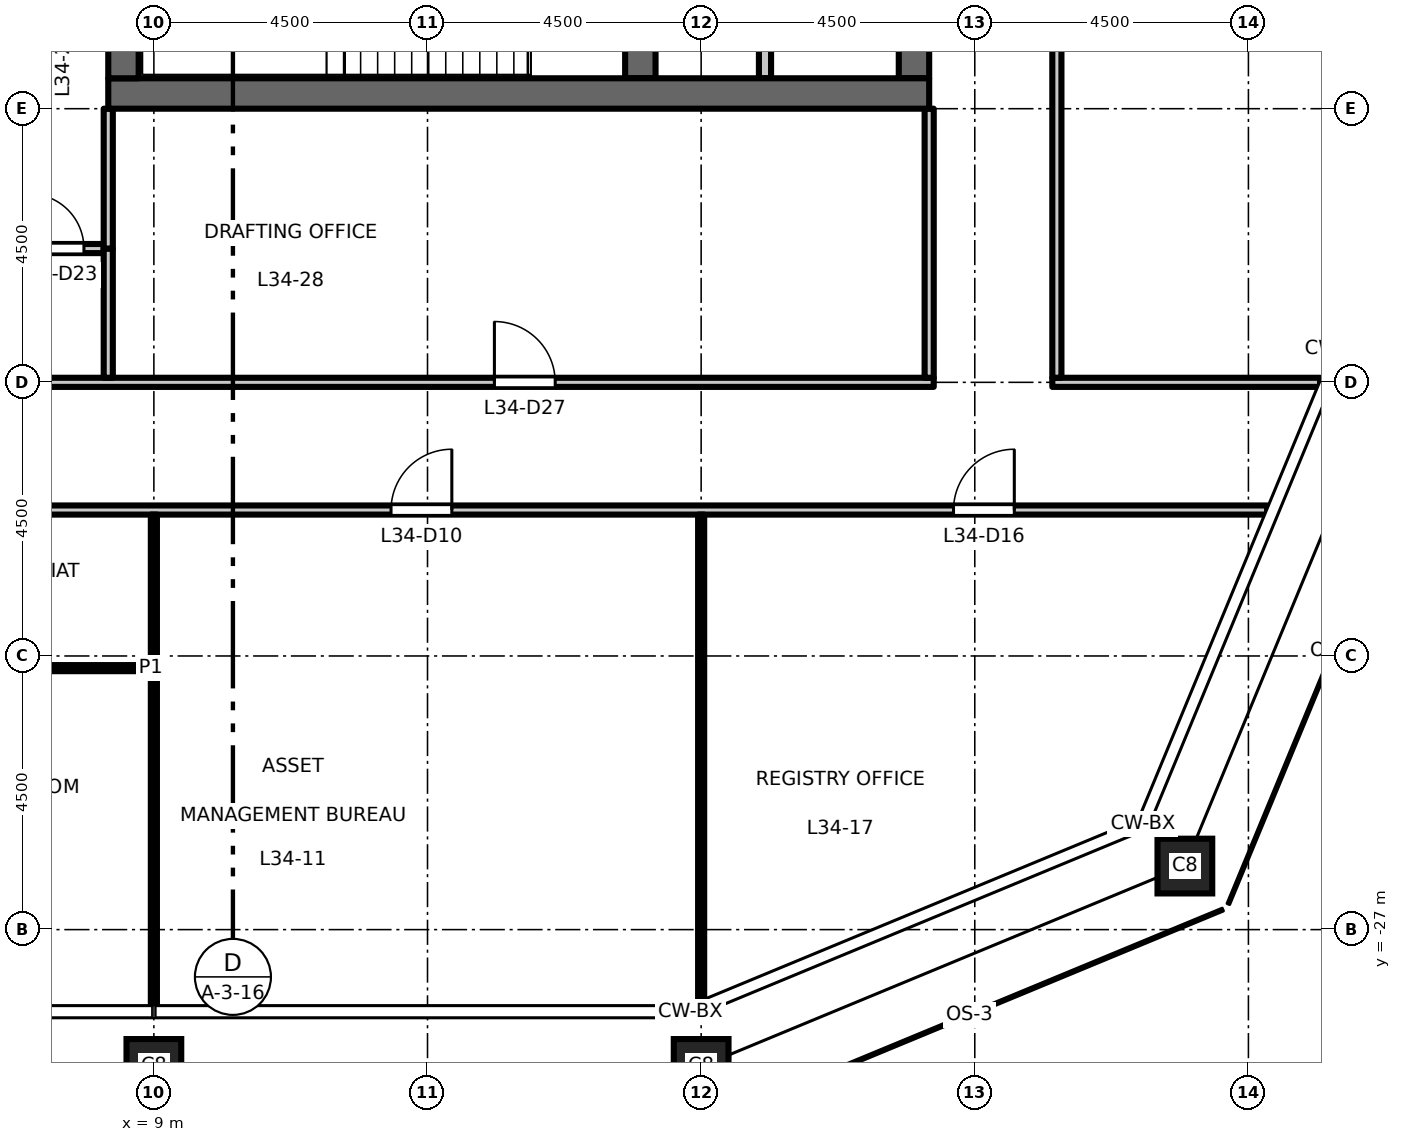
"""IFC4 building model, lengths in metres.
Left out: names, types, materials, properties, quantities, classifications, styles, units other than length and angle.
Written with IfcOpenShell. Run it as: python <this file> out.ifc"""

import sys

from ifc_helpers import new_model, si_unit, direction, frame, frame_2d, origin, origin_2d, place, context, subcontext, project, spatial, rectangle, hollow_rectangle, extrude, element, fill, save


model = new_model("IFC4")
c1 = context("Model", 3, precision=1e-05, world=origin(), true_north=direction((0.0, 1.0)))
c2 = subcontext(c1, "Body", "Model", "MODEL_VIEW")
j1 = project(units=[si_unit("LENGTHUNIT", "METRE"), si_unit("PLANEANGLEUNIT", "RADIAN")], contexts=[c1])
p1 = place(None, origin())
s1 = spatial("IfcSite", under=j1, at=p1, CompositionType="ELEMENT")
p2 = place(p1, origin())
s2 = spatial("IfcBuilding", under=s1, at=p2, CompositionType="ELEMENT")
p3 = place(p2, frame((0.0, 0.0, 158.7)))
s3 = spatial("IfcBuildingStorey", under=s2, at=p3, CompositionType="ELEMENT", Elevation=158.7)
for number, where, z_axis, x_axis in (
    (1, (9.0, -29.25, 0.0), (0.0, 0.0, 1.0), (1.0, 0.0, 0.0)),
    (2, (18.0, -29.25, 0.0), (0.0, 0.0, 1.0), (1.0, 0.0, 0.0)),
    (3, (25.955, -25.955, 0.0), (0.0, 0.0, 1.0), (1.0, 0.0, 0.0)),
):
    element("IfcColumn", number, at=place(p3, frame(where, z_axis=z_axis, x_axis=x_axis)), inside=s3, PredefinedType="COLUMN", context=c2, shape_type="SweptSolid", body=[
        extrude(hollow_rectangle(XDim=0.9, YDim=0.9, WallThickness=0.05, at=origin_2d()), origin(), (0.0, 0.0, 1.0), 4.5),
    ])
p4 = place(p3, frame((21.5, -13.0, 0.0), z_axis=(0.0, 0.0, 1.0), x_axis=(0.0, 1.0, 0.0)))
e4 = element("IfcWall", 4, at=p4, inside=s3, PredefinedType="SHEAR", context=c2, shape_type="SweptSolid", body=[
    extrude(rectangle(XDim=26.0, YDim=0.5, at=frame_2d((13.0, 0.0))), origin(), (0.0, 0.0, 1.0), 4.35),
])
p5 = place(p4, frame((16.825, 0.0, 0.0)))
e5 = element("IfcOpeningElement", 5, at=p5, cuts=e4, PredefinedType="OPENING", context=c2, shape_type="SweptSolid", body=[
    extrude(rectangle(XDim=1.8, YDim=2.1, at=frame_2d((0.9, 1.05))), frame((0.0, 0.26, 0.0), z_axis=(0.0, -1.0, 0.0), x_axis=(1.0, 0.0, 0.0)), (0.0, 0.0, 1.0), 0.52),
])
p6 = place(p4, frame((7.375, 0.0, 0.0)))
e6 = element("IfcOpeningElement", 6, at=p6, cuts=e4, PredefinedType="OPENING", context=c2, shape_type="SweptSolid", body=[
    extrude(rectangle(XDim=1.8, YDim=2.1, at=frame_2d((0.9, 1.05))), frame((0.0, 0.26, 0.0), z_axis=(0.0, -1.0, 0.0), x_axis=(1.0, 0.0, 0.0)), (0.0, 0.0, 1.0), 0.52),
])
p7 = place(p4, frame((23.8, 0.0, 0.0)))
e7 = element("IfcOpeningElement", 7, at=p7, cuts=e4, PredefinedType="OPENING", context=c2, shape_type="SweptSolid", body=[
    extrude(rectangle(XDim=0.9, YDim=2.1, at=frame_2d((0.45, 1.05))), frame((0.0, 0.26, 0.0), z_axis=(0.0, -1.0, 0.0), x_axis=(1.0, 0.0, 0.0)), (0.0, 0.0, 1.0), 0.52),
])
p8 = place(p3, frame((19.05, -13.0, 0.0), z_axis=(0.0, 0.0, 1.0), x_axis=(0.0, 1.0, 0.0)))
e8 = element("IfcWall", 8, at=p8, inside=s3, PredefinedType="PARTITIONING", context=c2, shape_type="SweptSolid", body=[
    extrude(rectangle(XDim=6.575, YDim=0.2, at=frame_2d((3.288, 0.0))), origin(), (0.0, 0.0, 1.0), 4.35),
])
p9 = place(p3, frame((17.0, -13.0, 0.0), z_axis=(0.0, 0.0, 1.0), x_axis=(0.0, 1.0, 0.0)))
e9 = element("IfcWall", 9, at=p9, inside=s3, PredefinedType="SHEAR", context=c2, shape_type="SweptSolid", body=[
    extrude(rectangle(XDim=6.575, YDim=0.5, at=frame_2d((3.288, 0.0))), origin(), (0.0, 0.0, 1.0), 4.35),
])
p10 = place(p3, frame((8.25, -13.25, 0.0), z_axis=(0.0, 0.0, 1.0), x_axis=(1.0, 0.0, 0.0)))
e10 = element("IfcWall", 10, at=p10, inside=s3, PredefinedType="SHEAR", context=c2, shape_type="SweptSolid", body=[
    extrude(rectangle(XDim=13.5, YDim=0.5, at=frame_2d((6.75, 0.0))), origin(), (0.0, 0.0, 1.0), 4.35),
])
p11 = place(p3, frame((8.5, -13.0, 0.0), z_axis=(0.0, 0.0, 1.0), x_axis=(0.0, 1.0, 0.0)))
e11 = element("IfcWall", 11, at=p11, inside=s3, PredefinedType="SHEAR", context=c2, shape_type="SweptSolid", body=[
    extrude(rectangle(XDim=26.0, YDim=0.5, at=frame_2d((13.0, 0.0))), origin(), (0.0, 0.0, 1.0), 4.35),
])
p12 = place(p3, frame((0.05, -22.7, 0.0), z_axis=(0.0, 0.0, 1.0), x_axis=(1.0, 0.0, 0.0)))
e12 = element("IfcWall", 12, at=p12, inside=s3, PredefinedType="PARTITIONING", context=c2, shape_type="SweptSolid", body=[
    extrude(rectangle(XDim=8.9, YDim=0.1, at=frame_2d((4.45, 0.0))), origin(), (0.0, 0.0, 1.0), 4.35),
])
p13 = place(p12, frame((3.85, 0.0, 0.0)))
e13 = element("IfcOpeningElement", 13, at=p13, cuts=e12, PredefinedType="OPENING", context=c2, shape_type="SweptSolid", body=[
    extrude(rectangle(XDim=1.0, YDim=2.1, at=frame_2d((0.5, 1.05))), frame((0.0, 0.06, 0.0), z_axis=(0.0, -1.0, 0.0), x_axis=(1.0, 0.0, 0.0)), (0.0, 0.0, 1.0), 0.12),
])
p14 = place(p3, frame((-27.308, -20.1, 0.0), z_axis=(0.0, 0.0, 1.0), x_axis=(1.0, 0.0, 0.0)))
e14 = element("IfcWall", 14, at=p14, inside=s3, PredefinedType="PARTITIONING", context=c2, shape_type="SweptSolid", body=[
    extrude(rectangle(XDim=54.616, YDim=0.15, at=frame_2d((27.308, 0.0))), origin(), (0.0, 0.0, 1.0), 4.35),
])
p15 = place(p14, frame((13.208, 0.0, 0.0)))
e15 = element("IfcOpeningElement", 15, at=p15, cuts=e14, PredefinedType="OPENING", context=c2, shape_type="SweptSolid", body=[
    extrude(rectangle(XDim=1.0, YDim=2.1, at=frame_2d((0.5, 1.05))), frame((0.0, 0.085, 0.0), z_axis=(0.0, -1.0, 0.0), x_axis=(1.0, 0.0, 0.0)), (0.0, 0.0, 1.0), 0.17),
])
p16 = place(p14, frame((22.208, 0.0, 0.0)))
e16 = element("IfcOpeningElement", 16, at=p16, cuts=e14, PredefinedType="OPENING", context=c2, shape_type="SweptSolid", body=[
    extrude(rectangle(XDim=1.0, YDim=2.1, at=frame_2d((0.5, 1.05))), frame((0.0, 0.085, 0.0), z_axis=(0.0, -1.0, 0.0), x_axis=(1.0, 0.0, 0.0)), (0.0, 0.0, 1.0), 0.17),
])
p17 = place(p14, frame((31.208, 0.0, 0.0)))
e17 = element("IfcOpeningElement", 17, at=p17, cuts=e14, PredefinedType="OPENING", context=c2, shape_type="SweptSolid", body=[
    extrude(rectangle(XDim=1.0, YDim=2.1, at=frame_2d((0.5, 1.05))), frame((0.0, 0.085, 0.0), z_axis=(0.0, -1.0, 0.0), x_axis=(1.0, 0.0, 0.0)), (0.0, 0.0, 1.0), 0.17),
])
p18 = place(p14, frame((40.208, 0.0, 0.0)))
e18 = element("IfcOpeningElement", 18, at=p18, cuts=e14, PredefinedType="OPENING", context=c2, shape_type="SweptSolid", body=[
    extrude(rectangle(XDim=1.0, YDim=2.1, at=frame_2d((0.5, 1.05))), frame((0.0, 0.085, 0.0), z_axis=(0.0, -1.0, 0.0), x_axis=(1.0, 0.0, 0.0)), (0.0, 0.0, 1.0), 0.17),
])
p19 = place(p14, frame((4.15, 0.0, 0.0)))
e19 = element("IfcOpeningElement", 19, at=p19, cuts=e14, PredefinedType="OPENING", context=c2, shape_type="SweptSolid", body=[
    extrude(rectangle(XDim=1.0, YDim=2.1, at=frame_2d((0.5, 1.05))), frame((0.0, 0.085, 0.0), z_axis=(0.0, -1.0, 0.0), x_axis=(1.0, 0.0, 0.0)), (0.0, 0.0, 1.0), 0.17),
])
p20 = place(p14, frame((49.458, 0.0, 0.0)))
e20 = element("IfcOpeningElement", 20, at=p20, cuts=e14, PredefinedType="OPENING", context=c2, shape_type="SweptSolid", body=[
    extrude(rectangle(XDim=1.0, YDim=2.1, at=frame_2d((0.5, 1.05))), frame((0.0, 0.085, 0.0), z_axis=(0.0, -1.0, 0.0), x_axis=(1.0, 0.0, 0.0)), (0.0, 0.0, 1.0), 0.17),
])
p21 = place(p3, frame((-21.825, -18.0, 0.0), z_axis=(0.0, 0.0, 1.0), x_axis=(1.0, 0.0, 0.0)))
e21 = element("IfcWall", 21, at=p21, inside=s3, PredefinedType="PARTITIONING", context=c2, shape_type="SweptSolid", body=[
    extrude(rectangle(XDim=43.65, YDim=0.15, at=frame_2d((21.825, 0.0))), origin(), (0.0, 0.0, 1.0), 4.35),
])
p22 = place(p21, frame((21.425, 0.0, 0.0)))
e22 = element("IfcOpeningElement", 22, at=p22, cuts=e21, PredefinedType="OPENING", context=c2, shape_type="SweptSolid", body=[
    extrude(rectangle(XDim=1.0, YDim=2.1, at=frame_2d((0.5, 1.05))), frame((0.0, 0.085, 0.0), z_axis=(0.0, -1.0, 0.0), x_axis=(1.0, 0.0, 0.0)), (0.0, 0.0, 1.0), 0.17),
])
p23 = place(p21, frame((6.425, 0.0, 0.0)))
e23 = element("IfcOpeningElement", 23, at=p23, cuts=e21, PredefinedType="OPENING", context=c2, shape_type="SweptSolid", body=[
    extrude(rectangle(XDim=1.0, YDim=2.1, at=frame_2d((0.5, 1.05))), frame((0.0, 0.085, 0.0), z_axis=(0.0, -1.0, 0.0), x_axis=(1.0, 0.0, 0.0)), (0.0, 0.0, 1.0), 0.17),
])
p24 = place(p21, frame((36.425, 0.0, 0.0)))
e24 = element("IfcOpeningElement", 24, at=p24, cuts=e21, PredefinedType="OPENING", context=c2, shape_type="SweptSolid", body=[
    extrude(rectangle(XDim=1.0, YDim=2.1, at=frame_2d((0.5, 1.05))), frame((0.0, 0.085, 0.0), z_axis=(0.0, -1.0, 0.0), x_axis=(1.0, 0.0, 0.0)), (0.0, 0.0, 1.0), 0.17),
])
p25 = place(p3, frame((23.775, -18.0, 0.0), z_axis=(0.0, 0.0, 1.0), x_axis=(1.0, 0.0, 0.0)))
e25 = element("IfcWall", 25, at=p25, inside=s3, PredefinedType="PARTITIONING", context=c2, shape_type="SweptSolid", body=[
    extrude(rectangle(XDim=4.403, YDim=0.15, at=frame_2d((2.202, 0.0))), origin(), (0.0, 0.0, 1.0), 4.35),
])
p26 = place(p3, frame((6.8, -15.8, 0.0), z_axis=(0.0, 0.0, 1.0), x_axis=(1.0, 0.0, 0.0)))
e26 = element("IfcWall", 26, at=p26, inside=s3, PredefinedType="PARTITIONING", context=c2, shape_type="SweptSolid", body=[
    extrude(rectangle(XDim=1.375, YDim=0.15, at=frame_2d((0.688, 0.0))), origin(), (0.0, 0.0, 1.0), 4.35),
])
p27 = place(p26, frame((0.15, 0.0, 0.0)))
e27 = element("IfcOpeningElement", 27, at=p27, cuts=e26, PredefinedType="OPENING", context=c2, shape_type="SweptSolid", body=[
    extrude(rectangle(XDim=0.9, YDim=2.1, at=frame_2d((0.45, 1.05))), frame((0.0, 0.085, 0.0), z_axis=(0.0, -1.0, 0.0), x_axis=(1.0, 0.0, 0.0)), (0.0, 0.0, 1.0), 0.17),
])
p28 = place(p3, frame((8.25, -17.925, 0.0), z_axis=(0.0, 0.0, 1.0), x_axis=(0.0, 1.0, 0.0)))
e28 = element("IfcWall", 28, at=p28, inside=s3, PredefinedType="PARTITIONING", context=c2, shape_type="SweptSolid", body=[
    extrude(rectangle(XDim=2.125, YDim=0.15, at=frame_2d((1.062, 0.0))), origin(), (0.0, 0.0, 1.0), 4.35),
])
p29 = place(p3, frame((8.25, -15.8, 0.0), z_axis=(0.0, 0.0, 1.0), x_axis=(0.0, 1.0, 0.0)))
e29 = element("IfcWall", 29, at=p29, inside=s3, PredefinedType="PARTITIONING", context=c2, shape_type="SweptSolid", body=[
    extrude(rectangle(XDim=2.3, YDim=0.15, at=frame_2d((1.15, 0.0))), origin(), (0.0, 0.0, 1.0), 4.35),
])
p30 = place(p3, frame((9.0, -28.26, 0.0), z_axis=(0.0, 0.0, 1.0), x_axis=(0.0, 1.0, 0.0)))
e30 = element("IfcWall", 30, at=p30, inside=s3, PredefinedType="PARTITIONING", context=c2, shape_type="SweptSolid", body=[
    extrude(rectangle(XDim=8.085, YDim=0.1, at=frame_2d((4.042, 0.0))), origin(), (0.0, 0.0, 1.0), 3.45),
])
p31 = place(p3, frame((18.0, -28.178, 0.0), z_axis=(0.0, 0.0, 1.0), x_axis=(0.0, 1.0, 0.0)))
e31 = element("IfcWall", 31, at=p31, inside=s3, PredefinedType="PARTITIONING", context=c2, shape_type="SweptSolid", body=[
    extrude(rectangle(XDim=8.003, YDim=0.1, at=frame_2d((4.001, 0.0))), origin(), (0.0, 0.0, 1.0), 3.45),
])
p32 = place(p3, frame((21.75, -17.925, 0.0), z_axis=(0.0, 0.0, 1.0), x_axis=(0.0, 1.0, 0.0)))
e32 = element("IfcWall", 32, at=p32, inside=s3, PredefinedType="PARTITIONING", context=c2, shape_type="SweptSolid", body=[
    extrude(rectangle(XDim=4.425, YDim=0.15, at=frame_2d((2.212, 0.0))), origin(), (0.0, 0.0, 1.0), 4.35),
])
p33 = place(p3, frame((23.85, -17.925, 0.0), z_axis=(0.0, 0.0, 1.0), x_axis=(0.0, 1.0, 0.0)))
e33 = element("IfcWall", 33, at=p33, inside=s3, PredefinedType="PARTITIONING", context=c2, shape_type="SweptSolid", body=[
    extrude(rectangle(XDim=35.85, YDim=0.15, at=frame_2d((17.925, 0.0))), origin(), (0.0, 0.0, 1.0), 4.35),
])
p34 = place(p33, frame((17.325, 0.0, 0.0)))
e34 = element("IfcOpeningElement", 34, at=p34, cuts=e33, PredefinedType="OPENING", context=c2, shape_type="SweptSolid", body=[
    extrude(rectangle(XDim=1.0, YDim=2.1, at=frame_2d((0.5, 1.05))), frame((0.0, 0.085, 0.0), z_axis=(0.0, -1.0, 0.0), x_axis=(1.0, 0.0, 0.0)), (0.0, 0.0, 1.0), 0.17),
])
p35 = place(p18, origin())
e35 = element("IfcDoor", 35, at=p35, inside=s3, OperationType="SINGLE_SWING_RIGHT", PredefinedType="DOOR", context=c2, shape_type="SweptSolid", body=[
    extrude(rectangle(XDim=1.0, YDim=2.1, at=frame_2d((0.5, 1.05))), frame((0.0, 0.025, 0.0), z_axis=(0.0, -1.0, 0.0), x_axis=(1.0, 0.0, 0.0)), (0.0, 0.0, 1.0), 0.05),
])
fill(e18, e35)
p36 = place(p20, origin())
e36 = element("IfcDoor", 36, at=p36, inside=s3, OperationType="SINGLE_SWING_RIGHT", PredefinedType="DOOR", context=c2, shape_type="SweptSolid", body=[
    extrude(rectangle(XDim=1.0, YDim=2.1, at=frame_2d((0.5, 1.05))), frame((0.0, 0.025, 0.0), z_axis=(0.0, -1.0, 0.0), x_axis=(1.0, 0.0, 0.0)), (0.0, 0.0, 1.0), 0.05),
])
fill(e20, e36)
p37 = place(p27, origin())
e37 = element("IfcDoor", 37, at=p37, inside=s3, OperationType="SINGLE_SWING_LEFT", PredefinedType="DOOR", context=c2, shape_type="SweptSolid", body=[
    extrude(rectangle(XDim=0.9, YDim=2.1, at=frame_2d((0.45, 1.05))), frame((0.0, 0.025, 0.0), z_axis=(0.0, -1.0, 0.0), x_axis=(1.0, 0.0, 0.0)), (0.0, 0.0, 1.0), 0.05),
])
fill(e27, e37)
p38 = place(p24, origin())
e38 = element("IfcDoor", 38, at=p38, inside=s3, OperationType="SINGLE_SWING_LEFT", PredefinedType="DOOR", context=c2, shape_type="SweptSolid", body=[
    extrude(rectangle(XDim=1.0, YDim=2.1, at=frame_2d((0.5, 1.05))), frame((0.0, 0.025, 0.0), z_axis=(0.0, -1.0, 0.0), x_axis=(1.0, 0.0, 0.0)), (0.0, 0.0, 1.0), 0.05),
])
fill(e24, e38)
save(model, sys.argv[1])
